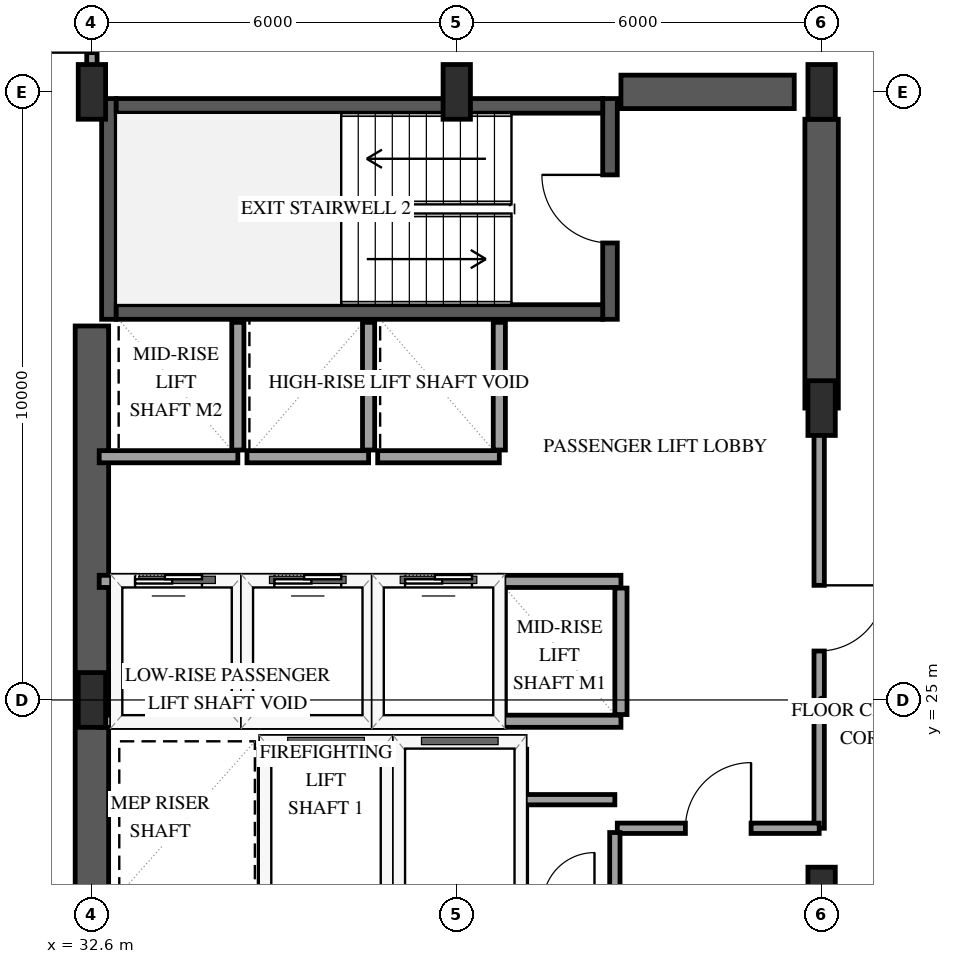
"""IFC4 building model, lengths in metres.
Left out: names, types, materials, properties, quantities, classifications, styles, units other than length and angle.
Written with IfcOpenShell. Run it as: python <this file> out.ifc"""

import sys

from ifc_helpers import new_model, si_unit, direction, frame, frame_2d, origin, origin_2d, place, context, subcontext, project, spatial, rectangle, extrude, element, fill, save


model = new_model("IFC4")
c1 = context("Model", 3, precision=1e-05, world=origin(), true_north=direction((0.0, 1.0)))
c2 = subcontext(c1, "Body", "Model", "MODEL_VIEW")
j1 = project(units=[si_unit("LENGTHUNIT", "METRE"), si_unit("PLANEANGLEUNIT", "RADIAN")], contexts=[c1])
p1 = place(None, origin())
s1 = spatial("IfcSite", under=j1, at=p1, CompositionType="ELEMENT")
p2 = place(p1, origin())
s2 = spatial("IfcBuilding", under=s1, at=p2, CompositionType="ELEMENT")
p3 = place(p2, frame((0.0, 0.0, 99.1)))
s3 = spatial("IfcBuildingStorey", under=s2, at=p3, CompositionType="ELEMENT", Elevation=99.1)
p4 = place(p3, frame((32.88, 31.26, 0.0), z_axis=(0.0, 0.0, 1.0), x_axis=(0.0, 1.0, 0.0)))
e1 = element("IfcWall", 1, at=p4, inside=s3, PredefinedType="SHEAR", context=c2, shape_type="SweptSolid", body=[
    extrude(rectangle(XDim=3.63, YDim=0.24, at=frame_2d((1.815, 0.0))), origin(), (0.0, 0.0, 1.0), 3.9),
])
p5 = place(p3, frame((41.12, 31.26, 0.0), z_axis=(0.0, 0.0, 1.0), x_axis=(0.0, 1.0, 0.0)))
e2 = element("IfcWall", 2, at=p5, inside=s3, PredefinedType="SHEAR", context=c2, shape_type="SweptSolid", body=[
    extrude(rectangle(XDim=3.63, YDim=0.24, at=frame_2d((1.815, 0.0))), origin(), (0.0, 0.0, 1.0), 3.9),
])
p6 = place(p5, frame((1.255, 0.0, 0.0)))
e3 = element("IfcOpeningElement", 3, at=p6, cuts=e2, PredefinedType="OPENING", context=c2, shape_type="SweptSolid", body=[
    extrude(rectangle(XDim=1.12, YDim=2.15, at=frame_2d((0.56, 1.075))), frame((0.0, 0.13, 0.0), z_axis=(0.0, -1.0, 0.0), x_axis=(1.0, 0.0, 0.0)), (0.0, 0.0, 1.0), 0.26),
])
for number, where, z_axis, x_axis in (
    (4, (33.0, 31.38, 0.0), (0.0, 0.0, 1.0), (1.0, 0.0, 0.0)),
    (5, (33.0, 34.77, 0.0), (0.0, 0.0, 1.0), (1.0, 0.0, 0.0)),
):
    element("IfcWall", number, at=place(p3, frame(where, z_axis=z_axis, x_axis=x_axis)), inside=s3, PredefinedType="SHEAR", context=c2, shape_type="SweptSolid", body=[
        extrude(rectangle(XDim=8.0, YDim=0.24, at=frame_2d((4.0, 0.0))), origin(), (0.0, 0.0, 1.0), 3.9),
    ])
p7 = place(p3, frame((32.6, 18.85, 0.0), z_axis=(0.0, 0.0, 1.0), x_axis=(0.0, 1.0, 0.0)))
e6 = element("IfcWall", 6, at=p7, inside=s3, PredefinedType="SHEAR", context=c2, shape_type="SweptSolid", body=[
    extrude(rectangle(XDim=12.3, YDim=0.55, at=frame_2d((6.15, 0.0))), origin(), (0.0, 0.0, 1.0), 3.9),
])
p8 = place(p3, frame((41.3, 35.0, 0.0), z_axis=(0.0, 0.0, 1.0), x_axis=(1.0, 0.0, 0.0)))
e7 = element("IfcWall", 7, at=p8, inside=s3, PredefinedType="SHEAR", context=c2, shape_type="SweptSolid", body=[
    extrude(rectangle(XDim=2.85, YDim=0.55, at=frame_2d((1.425, 0.0))), origin(), (0.0, 0.0, 1.0), 3.9),
])
p9 = place(p3, frame((44.6, 29.8, 0.0), z_axis=(0.0, 0.0, 1.0), x_axis=(0.0, 1.0, 0.0)))
e8 = element("IfcWall", 8, at=p9, inside=s3, PredefinedType="SHEAR", context=c2, shape_type="SweptSolid", body=[
    extrude(rectangle(XDim=4.75, YDim=0.55, at=frame_2d((2.375, 0.0))), origin(), (0.0, 0.0, 1.0), 3.9),
])
for number, where, z_axis, x_axis in (
    (9, (32.6, 25.0, 0.0), (0.0, 0.0, 1.0), (1.0, 0.0, 0.0)),
    (10, (32.6, 35.0, 0.0), (0.0, 0.0, 1.0), (1.0, 0.0, 0.0)),
    (11, (38.6, 35.0, 0.0), (0.0, 0.0, 1.0), (1.0, 0.0, 0.0)),
    (12, (44.6, 21.8, 0.0), (0.0, 0.0, 1.0), (1.0, 0.0, 0.0)),
    (13, (44.6, 29.8, 0.0), (0.0, 0.0, 1.0), (1.0, 0.0, 0.0)),
    (14, (44.6, 35.0, 0.0), (0.0, 0.0, 1.0), (1.0, 0.0, 0.0)),
):
    element("IfcColumn", number, at=place(p3, frame(where, z_axis=z_axis, x_axis=x_axis)), inside=s3, PredefinedType="PILASTER", context=c2, shape_type="SweptSolid", body=[
        extrude(rectangle(XDim=0.45, YDim=0.9, at=origin_2d()), origin(), (0.0, 0.0, 1.0), 3.9),
    ])
p10 = place(p3, frame((35.45, 24.3, 0.0), z_axis=(0.0, 0.0, 1.0), x_axis=(1.0, 0.0, 0.0)))
e15 = element("IfcWall", 15, at=p10, inside=s3, PredefinedType="SOLIDWALL", context=c2, shape_type="SweptSolid", body=[
    extrude(rectangle(XDim=2.0, YDim=0.2, at=frame_2d((1.0, 0.0))), origin(), (0.0, 0.0, 1.0), 3.6),
])
for number, where, z_axis, x_axis in (
    (16, (35.45, 21.81, 0.0), (0.0, 0.0, 1.0), (0.0, 1.0, 0.0)),
    (17, (37.45, 21.81, 0.0), (0.0, 0.0, 1.0), (0.0, 1.0, 0.0)),
):
    element("IfcWall", number, at=place(p3, frame(where, z_axis=z_axis, x_axis=x_axis)), inside=s3, PredefinedType="SOLIDWALL", context=c2, shape_type="SweptSolid", body=[
        extrude(rectangle(XDim=2.38, YDim=0.2, at=frame_2d((1.19, 0.0))), origin(), (0.0, 0.0, 1.0), 3.6),
    ])
p11 = place(p3, frame((37.65, 24.3, 0.0), z_axis=(0.0, 0.0, 1.0), x_axis=(1.0, 0.0, 0.0)))
e18 = element("IfcWall", 18, at=p11, inside=s3, PredefinedType="SOLIDWALL", context=c2, shape_type="SweptSolid", body=[
    extrude(rectangle(XDim=2.0, YDim=0.2, at=frame_2d((1.0, 0.0))), origin(), (0.0, 0.0, 1.0), 3.6),
])
p12 = place(p3, frame((39.65, 21.81, 0.0), z_axis=(0.0, 0.0, 1.0), x_axis=(0.0, 1.0, 0.0)))
e19 = element("IfcWall", 19, at=p12, inside=s3, PredefinedType="SOLIDWALL", context=c2, shape_type="SweptSolid", body=[
    extrude(rectangle(XDim=2.38, YDim=0.2, at=frame_2d((1.19, 0.0))), origin(), (0.0, 0.0, 1.0), 3.6),
])
p13 = place(p3, frame((32.72, 24.65, 0.0), z_axis=(0.0, 0.0, 1.0), x_axis=(1.0, 0.0, 0.0)))
e20 = element("IfcWall", 20, at=p13, inside=s3, PredefinedType="SOLIDWALL", context=c2, shape_type="SweptSolid", body=[
    extrude(rectangle(XDim=2.28, YDim=0.2, at=frame_2d((1.14, 0.0))), origin(), (0.0, 0.0, 1.0), 3.6),
])
p14 = place(p3, frame((32.72, 26.95, 0.0), z_axis=(0.0, 0.0, 1.0), x_axis=(1.0, 0.0, 0.0)))
e21 = element("IfcWall", 21, at=p14, inside=s3, PredefinedType="SOLIDWALL", context=c2, shape_type="SweptSolid", body=[
    extrude(rectangle(XDim=2.28, YDim=0.2, at=frame_2d((1.14, 0.0))), origin(), (0.0, 0.0, 1.0), 3.6),
])
p15 = place(p14, frame((0.59, 0.0, 0.0)))
e22 = element("IfcOpeningElement", 22, at=p15, cuts=e21, PredefinedType="OPENING", context=c2, shape_type="SweptSolid", body=[
    extrude(rectangle(XDim=1.1, YDim=2.15, at=frame_2d((0.55, 1.075))), frame((0.0, 0.11, 0.0), z_axis=(0.0, -1.0, 0.0), x_axis=(1.0, 0.0, 0.0)), (0.0, 0.0, 1.0), 0.22),
])
p16 = place(p3, frame((35.0, 24.76, 0.0), z_axis=(0.0, 0.0, 1.0), x_axis=(0.0, 1.0, 0.0)))
e23 = element("IfcWall", 23, at=p16, inside=s3, PredefinedType="SOLIDWALL", context=c2, shape_type="SweptSolid", body=[
    extrude(rectangle(XDim=2.08, YDim=0.2, at=frame_2d((1.04, 0.0))), origin(), (0.0, 0.0, 1.0), 3.6),
])
p17 = place(p3, frame((35.15, 24.65, 0.0), z_axis=(0.0, 0.0, 1.0), x_axis=(1.0, 0.0, 0.0)))
e24 = element("IfcWall", 24, at=p17, inside=s3, PredefinedType="SOLIDWALL", context=c2, shape_type="SweptSolid", body=[
    extrude(rectangle(XDim=2.0, YDim=0.2, at=frame_2d((1.0, 0.0))), origin(), (0.0, 0.0, 1.0), 3.6),
])
p18 = place(p3, frame((35.15, 26.95, 0.0), z_axis=(0.0, 0.0, 1.0), x_axis=(1.0, 0.0, 0.0)))
e25 = element("IfcWall", 25, at=p18, inside=s3, PredefinedType="SOLIDWALL", context=c2, shape_type="SweptSolid", body=[
    extrude(rectangle(XDim=2.0, YDim=0.2, at=frame_2d((1.0, 0.0))), origin(), (0.0, 0.0, 1.0), 3.6),
])
p19 = place(p18, frame((0.45, 0.0, 0.0)))
e26 = element("IfcOpeningElement", 26, at=p19, cuts=e25, PredefinedType="OPENING", context=c2, shape_type="SweptSolid", body=[
    extrude(rectangle(XDim=1.1, YDim=2.15, at=frame_2d((0.55, 1.075))), frame((0.0, 0.11, 0.0), z_axis=(0.0, -1.0, 0.0), x_axis=(1.0, 0.0, 0.0)), (0.0, 0.0, 1.0), 0.22),
])
p20 = place(p3, frame((37.15, 24.76, 0.0), z_axis=(0.0, 0.0, 1.0), x_axis=(0.0, 1.0, 0.0)))
e27 = element("IfcWall", 27, at=p20, inside=s3, PredefinedType="SOLIDWALL", context=c2, shape_type="SweptSolid", body=[
    extrude(rectangle(XDim=2.08, YDim=0.2, at=frame_2d((1.04, 0.0))), origin(), (0.0, 0.0, 1.0), 3.6),
])
p21 = place(p3, frame((37.3, 24.65, 0.0), z_axis=(0.0, 0.0, 1.0), x_axis=(1.0, 0.0, 0.0)))
e28 = element("IfcWall", 28, at=p21, inside=s3, PredefinedType="SOLIDWALL", context=c2, shape_type="SweptSolid", body=[
    extrude(rectangle(XDim=2.0, YDim=0.2, at=frame_2d((1.0, 0.0))), origin(), (0.0, 0.0, 1.0), 3.6),
])
p22 = place(p3, frame((37.3, 26.95, 0.0), z_axis=(0.0, 0.0, 1.0), x_axis=(1.0, 0.0, 0.0)))
e29 = element("IfcWall", 29, at=p22, inside=s3, PredefinedType="SOLIDWALL", context=c2, shape_type="SweptSolid", body=[
    extrude(rectangle(XDim=2.0, YDim=0.2, at=frame_2d((1.0, 0.0))), origin(), (0.0, 0.0, 1.0), 3.6),
])
p23 = place(p22, frame((0.45, 0.0, 0.0)))
e30 = element("IfcOpeningElement", 30, at=p23, cuts=e29, PredefinedType="OPENING", context=c2, shape_type="SweptSolid", body=[
    extrude(rectangle(XDim=1.1, YDim=2.15, at=frame_2d((0.55, 1.075))), frame((0.0, 0.11, 0.0), z_axis=(0.0, -1.0, 0.0), x_axis=(1.0, 0.0, 0.0)), (0.0, 0.0, 1.0), 0.22),
])
p24 = place(p3, frame((39.3, 24.76, 0.0), z_axis=(0.0, 0.0, 1.0), x_axis=(0.0, 1.0, 0.0)))
e31 = element("IfcWall", 31, at=p24, inside=s3, PredefinedType="SOLIDWALL", context=c2, shape_type="SweptSolid", body=[
    extrude(rectangle(XDim=2.08, YDim=0.2, at=frame_2d((1.04, 0.0))), origin(), (0.0, 0.0, 1.0), 3.6),
])
for number, where, z_axis, x_axis in (
    (32, (39.3, 24.65, 0.0), (0.0, 0.0, 1.0), (1.0, 0.0, 0.0)),
    (33, (39.3, 26.95, 0.0), (0.0, 0.0, 1.0), (1.0, 0.0, 0.0)),
):
    element("IfcWall", number, at=place(p3, frame(where, z_axis=z_axis, x_axis=x_axis)), inside=s3, PredefinedType="SOLIDWALL", context=c2, shape_type="SweptSolid", body=[
        extrude(rectangle(XDim=2.0, YDim=0.2, at=frame_2d((1.0, 0.0))), origin(), (0.0, 0.0, 1.0), 3.6),
    ])
p25 = place(p3, frame((41.3, 24.76, 0.0), z_axis=(0.0, 0.0, 1.0), x_axis=(0.0, 1.0, 0.0)))
e34 = element("IfcWall", 34, at=p25, inside=s3, PredefinedType="SOLIDWALL", context=c2, shape_type="SweptSolid", body=[
    extrude(rectangle(XDim=2.08, YDim=0.2, at=frame_2d((1.04, 0.0))), origin(), (0.0, 0.0, 1.0), 3.6),
])
p26 = place(p3, frame((32.72, 29.0, 0.0), z_axis=(0.0, 0.0, 1.0), x_axis=(1.0, 0.0, 0.0)))
e35 = element("IfcWall", 35, at=p26, inside=s3, PredefinedType="SOLIDWALL", context=c2, shape_type="SweptSolid", body=[
    extrude(rectangle(XDim=2.28, YDim=0.2, at=frame_2d((1.14, 0.0))), origin(), (0.0, 0.0, 1.0), 3.6),
])
p27 = place(p3, frame((35.0, 29.11, 0.0), z_axis=(0.0, 0.0, 1.0), x_axis=(0.0, 1.0, 0.0)))
e36 = element("IfcWall", 36, at=p27, inside=s3, PredefinedType="SOLIDWALL", context=c2, shape_type="SweptSolid", body=[
    extrude(rectangle(XDim=2.1, YDim=0.2, at=frame_2d((1.05, 0.0))), origin(), (0.0, 0.0, 1.0), 3.6),
])
p28 = place(p3, frame((35.15, 29.0, 0.0), z_axis=(0.0, 0.0, 1.0), x_axis=(1.0, 0.0, 0.0)))
e37 = element("IfcWall", 37, at=p28, inside=s3, PredefinedType="SOLIDWALL", context=c2, shape_type="SweptSolid", body=[
    extrude(rectangle(XDim=2.0, YDim=0.2, at=frame_2d((1.0, 0.0))), origin(), (0.0, 0.0, 1.0), 3.6),
])
p29 = place(p3, frame((37.15, 29.11, 0.0), z_axis=(0.0, 0.0, 1.0), x_axis=(0.0, 1.0, 0.0)))
e38 = element("IfcWall", 38, at=p29, inside=s3, PredefinedType="SOLIDWALL", context=c2, shape_type="SweptSolid", body=[
    extrude(rectangle(XDim=2.1, YDim=0.2, at=frame_2d((1.05, 0.0))), origin(), (0.0, 0.0, 1.0), 3.6),
])
p30 = place(p3, frame((37.3, 29.0, 0.0), z_axis=(0.0, 0.0, 1.0), x_axis=(1.0, 0.0, 0.0)))
e39 = element("IfcWall", 39, at=p30, inside=s3, PredefinedType="SOLIDWALL", context=c2, shape_type="SweptSolid", body=[
    extrude(rectangle(XDim=2.0, YDim=0.2, at=frame_2d((1.0, 0.0))), origin(), (0.0, 0.0, 1.0), 3.6),
])
p31 = place(p3, frame((39.3, 29.11, 0.0), z_axis=(0.0, 0.0, 1.0), x_axis=(0.0, 1.0, 0.0)))
e40 = element("IfcWall", 40, at=p31, inside=s3, PredefinedType="SOLIDWALL", context=c2, shape_type="SweptSolid", body=[
    extrude(rectangle(XDim=2.1, YDim=0.2, at=frame_2d((1.05, 0.0))), origin(), (0.0, 0.0, 1.0), 3.6),
])
p32 = place(p3, frame((44.56, 29.8, 0.0), z_axis=(0.0, 0.0, 1.0), x_axis=(0.0, -1.0, 0.0)))
e41 = element("IfcWall", 41, at=p32, inside=s3, PredefinedType="PARTITIONING", context=c2, shape_type="SweptSolid", body=[
    extrude(rectangle(XDim=6.91, YDim=0.17, at=frame_2d((3.455, 0.0))), origin(), (0.0, 0.0, 1.0), 2.64),
])
p33 = place(p32, frame((2.915, 0.0, 0.0)))
e42 = element("IfcOpeningElement", 42, at=p33, cuts=e41, PredefinedType="OPENING", context=c2, shape_type="SweptSolid", body=[
    extrude(rectangle(XDim=1.08, YDim=2.15, at=frame_2d((0.54, 1.075))), frame((0.0, 0.095, 0.0), z_axis=(0.0, -1.0, 0.0), x_axis=(1.0, 0.0, 0.0)), (0.0, 0.0, 1.0), 0.19),
])
p34 = place(p3, frame((41.24, 22.89, 0.0), z_axis=(0.0, 0.0, 1.0), x_axis=(1.0, 0.0, 0.0)))
e43 = element("IfcWall", 43, at=p34, inside=s3, PredefinedType="PARTITIONING", context=c2, shape_type="SweptSolid", body=[
    extrude(rectangle(XDim=3.32, YDim=0.17, at=frame_2d((1.66, 0.0))), origin(), (0.0, 0.0, 1.0), 3.6),
])
p35 = place(p34, frame((1.12, 0.0, 0.0)))
e44 = element("IfcOpeningElement", 44, at=p35, cuts=e43, PredefinedType="OPENING", context=c2, shape_type="SweptSolid", body=[
    extrude(rectangle(XDim=1.08, YDim=2.15, at=frame_2d((0.54, 1.075))), frame((0.0, 0.095, 0.0), z_axis=(0.0, -1.0, 0.0), x_axis=(1.0, 0.0, 0.0)), (0.0, 0.0, 1.0), 0.19),
])
p36 = place(p3, frame((32.6, 35.07, 0.0), z_axis=(0.0, 0.0, 1.0), x_axis=(0.0, 1.0, 0.0)))
e45 = element("IfcWall", 45, at=p36, inside=s3, PredefinedType="PARTITIONING", context=c2, shape_type="SweptSolid", body=[
    extrude(rectangle(XDim=1.91, YDim=0.17, at=frame_2d((0.955, 0.0))), origin(), (0.0, 0.0, 1.0), 3.6),
])
p37 = place(p36, frame((0.575, 0.0, 0.0)))
e46 = element("IfcOpeningElement", 46, at=p37, cuts=e45, PredefinedType="OPENING", context=c2, shape_type="SweptSolid", body=[
    extrude(rectangle(XDim=0.98, YDim=2.15, at=frame_2d((0.49, 1.075))), frame((0.0, 0.095, 0.0), z_axis=(0.0, -1.0, 0.0), x_axis=(1.0, 0.0, 0.0)), (0.0, 0.0, 1.0), 0.19),
])
p38 = place(p3, frame((41.2, 21.7, 0.0), z_axis=(0.0, 0.0, 1.0), x_axis=(0.0, 1.0, 0.0)))
e47 = element("IfcWall", 47, at=p38, inside=s3, PredefinedType="PARTITIONING", context=c2, shape_type="SweptSolid", body=[
    extrude(rectangle(XDim=1.12, YDim=0.17, at=frame_2d((0.56, 0.0))), origin(), (0.0, 0.0, 1.0), 3.6),
])
p39 = place(p3, frame((41.2, 23.36, 0.0), z_axis=(0.0, 0.0, 1.0), x_axis=(-1.0, 0.0, 0.0)))
e48 = element("IfcWall", 48, at=p39, inside=s3, PredefinedType="PARTITIONING", context=c2, shape_type="SweptSolid", body=[
    extrude(rectangle(XDim=1.48, YDim=0.17, at=frame_2d((0.74, 0.0))), origin(), (0.0, 0.0, 1.0), 3.6),
])
p40 = place(p15, origin())
e49 = element("IfcDoor", 49, at=p40, inside=s3, OperationType="SLIDING_TO_LEFT", PredefinedType="DOOR", context=c2, shape_type="SweptSolid", body=[
    extrude(rectangle(XDim=1.1, YDim=2.15, at=frame_2d((0.55, 1.075))), frame((0.0, 0.025, 0.0), z_axis=(0.0, -1.0, 0.0), x_axis=(1.0, 0.0, 0.0)), (0.0, 0.0, 1.0), 0.05),
])
fill(e22, e49)
p41 = place(p19, origin())
e50 = element("IfcDoor", 50, at=p41, inside=s3, OperationType="SLIDING_TO_LEFT", PredefinedType="DOOR", context=c2, shape_type="SweptSolid", body=[
    extrude(rectangle(XDim=1.1, YDim=2.15, at=frame_2d((0.55, 1.075))), frame((0.0, 0.025, 0.0), z_axis=(0.0, -1.0, 0.0), x_axis=(1.0, 0.0, 0.0)), (0.0, 0.0, 1.0), 0.05),
])
fill(e26, e50)
p42 = place(p23, origin())
e51 = element("IfcDoor", 51, at=p42, inside=s3, OperationType="SLIDING_TO_LEFT", PredefinedType="DOOR", context=c2, shape_type="SweptSolid", body=[
    extrude(rectangle(XDim=1.1, YDim=2.15, at=frame_2d((0.55, 1.075))), frame((0.0, 0.025, 0.0), z_axis=(0.0, -1.0, 0.0), x_axis=(1.0, 0.0, 0.0)), (0.0, 0.0, 1.0), 0.05),
])
fill(e30, e51)
p43 = place(p6, origin())
e52 = element("IfcDoor", 52, at=p43, inside=s3, OperationType="SINGLE_SWING_RIGHT", PredefinedType="DOOR", context=c2, shape_type="SweptSolid", body=[
    extrude(rectangle(XDim=1.12, YDim=2.15, at=frame_2d((0.56, 1.075))), frame((0.0, 0.025, 0.0), z_axis=(0.0, -1.0, 0.0), x_axis=(1.0, 0.0, 0.0)), (0.0, 0.0, 1.0), 0.05),
])
fill(e3, e52)
p44 = place(p33, origin())
e53 = element("IfcDoor", 53, at=p44, inside=s3, OperationType="SINGLE_SWING_LEFT", PredefinedType="DOOR", context=c2, shape_type="SweptSolid", body=[
    extrude(rectangle(XDim=1.08, YDim=2.15, at=frame_2d((0.54, 1.075))), frame((0.0, 0.025, 0.0), z_axis=(0.0, -1.0, 0.0), x_axis=(1.0, 0.0, 0.0)), (0.0, 0.0, 1.0), 0.05),
])
fill(e42, e53)
p45 = place(p35, origin())
e54 = element("IfcDoor", 54, at=p45, inside=s3, OperationType="SINGLE_SWING_RIGHT", PredefinedType="DOOR", context=c2, shape_type="SweptSolid", body=[
    extrude(rectangle(XDim=1.08, YDim=2.15, at=frame_2d((0.54, 1.075))), frame((0.0, 0.025, 0.0), z_axis=(0.0, -1.0, 0.0), x_axis=(1.0, 0.0, 0.0)), (0.0, 0.0, 1.0), 0.05),
])
fill(e44, e54)
p46 = place(p37, origin())
e55 = element("IfcDoor", 55, at=p46, inside=s3, OperationType="SINGLE_SWING_LEFT", PredefinedType="DOOR", context=c2, shape_type="SweptSolid", body=[
    extrude(rectangle(XDim=0.98, YDim=2.15, at=frame_2d((0.49, 1.075))), frame((0.0, 0.025, 0.0), z_axis=(0.0, -1.0, 0.0), x_axis=(1.0, 0.0, 0.0)), (0.0, 0.0, 1.0), 0.05),
])
fill(e46, e55)
save(model, sys.argv[1])
